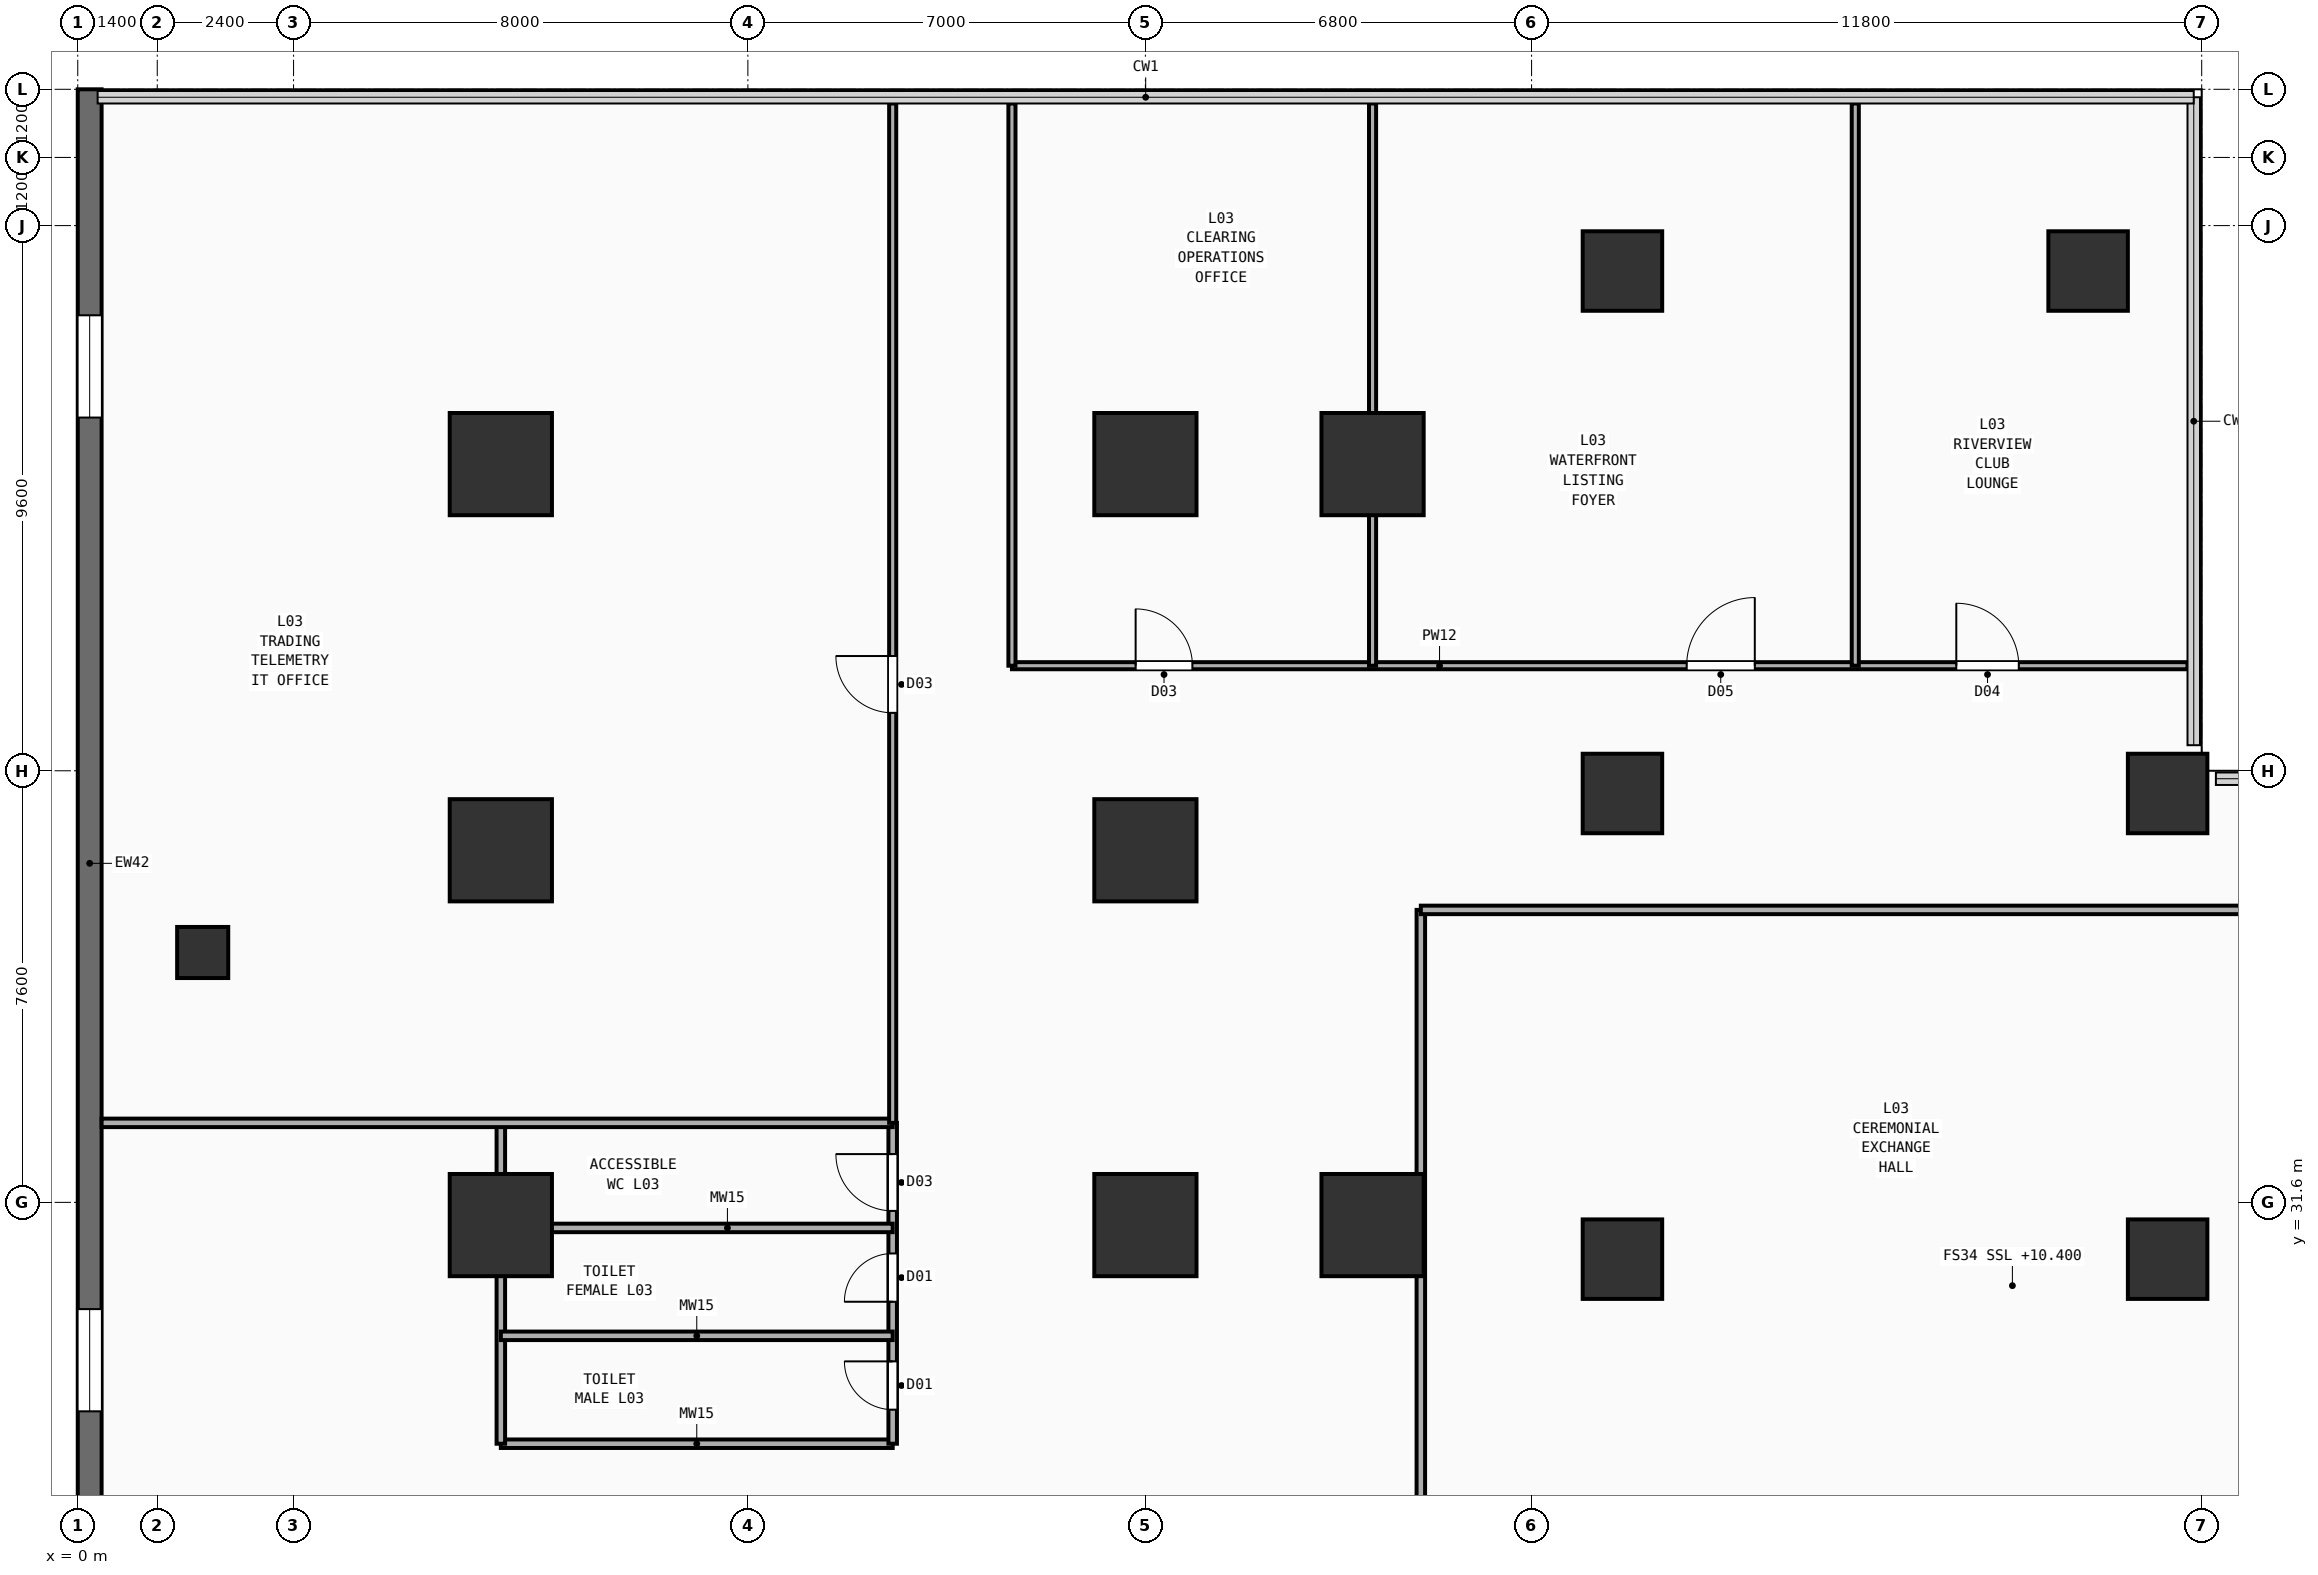
"""IFC4 building model, lengths in metres.
Left out: names, types, materials, properties, quantities, classifications, styles, units other than length and angle.
Written with IfcOpenShell. Run it as: python <this file> out.ifc"""

import sys

from ifc_helpers import new_model, si_unit, direction, frame, frame_2d, origin, origin_2d, place, context, subcontext, project, spatial, rectangle, extrude, element, fill, save


model = new_model("IFC4")
c1 = context("Model", 3, precision=1e-05, world=origin(), true_north=direction((0.0, 1.0)))
c2 = subcontext(c1, "Body", "Model", "MODEL_VIEW")
j1 = project(units=[si_unit("LENGTHUNIT", "METRE"), si_unit("PLANEANGLEUNIT", "RADIAN")], contexts=[c1])
p1 = place(None, origin())
s1 = spatial("IfcSite", under=j1, at=p1, CompositionType="ELEMENT")
p2 = place(p1, origin())
s2 = spatial("IfcBuilding", under=s1, at=p2, CompositionType="ELEMENT")
p3 = place(p2, frame((0.0, 0.0, 10.4)))
s3 = spatial("IfcBuildingStorey", under=s2, at=p3, CompositionType="ELEMENT", Elevation=10.4)
for number, where, z_axis, x_axis in (
    (1, (7.45, 31.2, 0.0), (0.0, 0.0, 1.0), (1.0, 0.0, 0.0)),
    (2, (7.45, 37.8, 0.0), (0.0, 0.0, 1.0), (1.0, 0.0, 0.0)),
    (3, (7.45, 44.6, 0.0), (0.0, 0.0, 1.0), (1.0, 0.0, 0.0)),
    (4, (18.8, 31.2, 0.0), (0.0, 0.0, 1.0), (1.0, 0.0, 0.0)),
    (5, (18.8, 37.8, 0.0), (0.0, 0.0, 1.0), (1.0, 0.0, 0.0)),
    (6, (18.8, 44.6, 0.0), (0.0, 0.0, 1.0), (1.0, 0.0, 0.0)),
    (7, (22.8, 31.2, 0.0), (0.0, 0.0, 1.0), (1.0, 0.0, 0.0)),
    (8, (22.8, 44.6, 0.0), (0.0, 0.0, 1.0), (1.0, 0.0, 0.0)),
):
    element("IfcColumn", number, at=place(p3, frame(where, z_axis=z_axis, x_axis=x_axis)), inside=s3, PredefinedType="COLUMN", context=c2, shape_type="SweptSolid", body=[
        extrude(rectangle(XDim=1.8, YDim=1.8, at=origin_2d()), origin(), (0.0, 0.0, 1.0), 4.46),
    ])
for number, where, z_axis, x_axis in (
    (9, (27.2, 30.6, 0.0), (0.0, 0.0, 1.0), (1.0, 0.0, 0.0)),
    (10, (36.8, 30.6, 0.0), (0.0, 0.0, 1.0), (1.0, 0.0, 0.0)),
    (11, (27.2, 38.8, 0.0), (0.0, 0.0, 1.0), (1.0, 0.0, 0.0)),
    (12, (36.8, 38.8, 0.0), (0.0, 0.0, 1.0), (1.0, 0.0, 0.0)),
    (13, (27.2, 48.0, 0.0), (0.0, 0.0, 1.0), (1.0, 0.0, 0.0)),
    (14, (35.4, 48.0, 0.0), (0.0, 0.0, 1.0), (1.0, 0.0, 0.0)),
):
    element("IfcColumn", number, at=place(p3, frame(where, z_axis=z_axis, x_axis=x_axis)), inside=s3, PredefinedType="COLUMN", context=c2, shape_type="SweptSolid", body=[
        extrude(rectangle(XDim=1.4, YDim=1.4, at=origin_2d()), origin(), (0.0, 0.0, 1.0), 4.46),
    ])
p4 = place(p3, frame((2.2, 36.0, 0.0), z_axis=(0.0, 0.0, 1.0), x_axis=(1.0, 0.0, 0.0)))
e15 = element("IfcColumn", 15, at=p4, inside=s3, PredefinedType="PILASTER", context=c2, shape_type="SweptSolid", body=[
    extrude(rectangle(XDim=0.9, YDim=0.9, at=origin_2d()), origin(), (0.0, 0.0, 1.0), 4.46),
])
p5 = place(p3, frame((0.21, 0.42, 0.0), z_axis=(0.0, 0.0, 1.0), x_axis=(0.0, 1.0, 0.0)))
e16 = element("IfcWall", 16, at=p5, inside=s3, PredefinedType="SOLIDWALL", context=c2, shape_type="SweptSolid", body=[
    extrude(rectangle(XDim=50.78, YDim=0.42, at=frame_2d((25.39, 0.0))), origin(), (0.0, 0.0, 1.0), 4.46),
])
p6 = place(p5, frame((8.0, 0.0, 0.95)))
e17 = element("IfcOpeningElement", 17, at=p6, cuts=e16, PredefinedType="OPENING", context=c2, shape_type="SweptSolid", body=[
    extrude(rectangle(XDim=1.8, YDim=2.1, at=frame_2d((0.9, 1.05))), frame((0.0, 0.22, 0.0), z_axis=(0.0, -1.0, 0.0), x_axis=(1.0, 0.0, 0.0)), (0.0, 0.0, 1.0), 0.44),
])
p7 = place(p5, frame((18.0, 0.0, 0.95)))
e18 = element("IfcOpeningElement", 18, at=p7, cuts=e16, PredefinedType="OPENING", context=c2, shape_type="SweptSolid", body=[
    extrude(rectangle(XDim=1.8, YDim=2.1, at=frame_2d((0.9, 1.05))), frame((0.0, 0.22, 0.0), z_axis=(0.0, -1.0, 0.0), x_axis=(1.0, 0.0, 0.0)), (0.0, 0.0, 1.0), 0.44),
])
p8 = place(p5, frame((27.5, 0.0, 0.95)))
e19 = element("IfcOpeningElement", 19, at=p8, cuts=e16, PredefinedType="OPENING", context=c2, shape_type="SweptSolid", body=[
    extrude(rectangle(XDim=1.8, YDim=2.1, at=frame_2d((0.9, 1.05))), frame((0.0, 0.22, 0.0), z_axis=(0.0, -1.0, 0.0), x_axis=(1.0, 0.0, 0.0)), (0.0, 0.0, 1.0), 0.44),
])
p9 = place(p5, frame((45.0, 0.0, 0.95)))
e20 = element("IfcOpeningElement", 20, at=p9, cuts=e16, PredefinedType="OPENING", context=c2, shape_type="SweptSolid", body=[
    extrude(rectangle(XDim=1.8, YDim=2.1, at=frame_2d((0.9, 1.05))), frame((0.0, 0.22, 0.0), z_axis=(0.0, -1.0, 0.0), x_axis=(1.0, 0.0, 0.0)), (0.0, 0.0, 1.0), 0.44),
])
p10 = place(p3, frame((7.45, 27.35, 0.0), z_axis=(0.0, 0.0, 1.0), x_axis=(1.0, 0.0, 0.0)))
e21 = element("IfcWall", 21, at=p10, inside=s3, PredefinedType="PLUMBINGWALL", context=c2, shape_type="SweptSolid", body=[
    extrude(rectangle(XDim=6.9, YDim=0.15, at=frame_2d((3.45, 0.0))), origin(), (0.0, 0.0, 1.0), 4.46),
])
p11 = place(p3, frame((7.45, 27.35, 0.0), z_axis=(0.0, 0.0, 1.0), x_axis=(0.0, 1.0, 0.0)))
e22 = element("IfcWall", 22, at=p11, inside=s3, PredefinedType="PLUMBINGWALL", context=c2, shape_type="SweptSolid", body=[
    extrude(rectangle(XDim=5.65, YDim=0.15, at=frame_2d((2.825, 0.0))), origin(), (0.0, 0.0, 1.0), 4.1),
])
p12 = place(p3, frame((14.35, 27.35, 0.0), z_axis=(0.0, 0.0, 1.0), x_axis=(0.0, 1.0, 0.0)))
e23 = element("IfcWall", 23, at=p12, inside=s3, PredefinedType="PLUMBINGWALL", context=c2, shape_type="SweptSolid", body=[
    extrude(rectangle(XDim=5.65, YDim=0.15, at=frame_2d((2.825, 0.0))), origin(), (0.0, 0.0, 1.0), 4.46),
])
p13 = place(p12, frame((0.6, 0.0, 0.0)))
e24 = element("IfcOpeningElement", 24, at=p13, cuts=e23, PredefinedType="OPENING", context=c2, shape_type="SweptSolid", body=[
    extrude(rectangle(XDim=0.85, YDim=2.15, at=frame_2d((0.425, 1.075))), frame((0.0, 0.085, 0.0), z_axis=(0.0, -1.0, 0.0), x_axis=(1.0, 0.0, 0.0)), (0.0, 0.0, 1.0), 0.17),
])
p14 = place(p12, frame((2.5, 0.0, 0.0)))
e25 = element("IfcOpeningElement", 25, at=p14, cuts=e23, PredefinedType="OPENING", context=c2, shape_type="SweptSolid", body=[
    extrude(rectangle(XDim=0.85, YDim=2.15, at=frame_2d((0.425, 1.075))), frame((0.0, 0.085, 0.0), z_axis=(0.0, -1.0, 0.0), x_axis=(1.0, 0.0, 0.0)), (0.0, 0.0, 1.0), 0.17),
])
p15 = place(p12, frame((4.1, 0.0, 0.0)))
e26 = element("IfcOpeningElement", 26, at=p15, cuts=e23, PredefinedType="OPENING", context=c2, shape_type="SweptSolid", body=[
    extrude(rectangle(XDim=1.0, YDim=2.2, at=frame_2d((0.5, 1.1))), frame((0.0, 0.085, 0.0), z_axis=(0.0, -1.0, 0.0), x_axis=(1.0, 0.0, 0.0)), (0.0, 0.0, 1.0), 0.17),
])
p16 = place(p3, frame((7.45, 29.25, 0.0), z_axis=(0.0, 0.0, 1.0), x_axis=(1.0, 0.0, 0.0)))
e27 = element("IfcWall", 27, at=p16, inside=s3, PredefinedType="PLUMBINGWALL", context=c2, shape_type="SweptSolid", body=[
    extrude(rectangle(XDim=6.9, YDim=0.15, at=frame_2d((3.45, 0.0))), origin(), (0.0, 0.0, 1.0), 3.96),
])
p17 = place(p3, frame((7.45, 31.15, 0.0), z_axis=(0.0, 0.0, 1.0), x_axis=(1.0, 0.0, 0.0)))
e28 = element("IfcWall", 28, at=p17, inside=s3, PredefinedType="PLUMBINGWALL", context=c2, shape_type="SweptSolid", body=[
    extrude(rectangle(XDim=6.9, YDim=0.15, at=frame_2d((3.45, 0.0))), origin(), (0.0, 0.0, 1.0), 3.76),
])
p18 = place(p3, frame((0.42, 33.0, 0.0), z_axis=(0.0, 0.0, 1.0), x_axis=(1.0, 0.0, 0.0)))
e29 = element("IfcWall", 29, at=p18, inside=s3, PredefinedType="PLUMBINGWALL", context=c2, shape_type="SweptSolid", body=[
    extrude(rectangle(XDim=13.93, YDim=0.15, at=frame_2d((6.965, 0.0))), origin(), (0.0, 0.0, 1.0), 4.46),
])
p19 = place(p3, frame((23.65, 16.35, 0.0), z_axis=(0.0, 0.0, 1.0), x_axis=(0.0, 1.0, 0.0)))
e30 = element("IfcWall", 30, at=p19, inside=s3, PredefinedType="PARTITIONING", context=c2, shape_type="SweptSolid", body=[
    extrude(rectangle(XDim=20.4, YDim=0.15, at=frame_2d((10.2, 0.0))), origin(), (0.0, 0.0, 1.0), 4.46),
])
p20 = place(p3, frame((23.65, 36.75, 0.0), z_axis=(0.0, 0.0, 1.0), x_axis=(1.0, 0.0, 0.0)))
e31 = element("IfcWall", 31, at=p20, inside=s3, PredefinedType="PARTITIONING", context=c2, shape_type="SweptSolid", body=[
    extrude(rectangle(XDim=40.9, YDim=0.15, at=frame_2d((20.45, 0.0))), origin(), (0.0, 0.0, 1.0), 4.46),
])
p21 = place(p3, frame((14.35, 33.0, 0.0), z_axis=(0.0, 0.0, 1.0), x_axis=(0.0, 1.0, 0.0)))
e32 = element("IfcWall", 32, at=p21, inside=s3, PredefinedType="PARTITIONING", context=c2, shape_type="SweptSolid", body=[
    extrude(rectangle(XDim=17.95, YDim=0.125, at=frame_2d((8.975, 0.0))), origin(), (0.0, 0.0, 1.0), 4.46),
])
p22 = place(p21, frame((7.22, 0.0, 0.0)))
e33 = element("IfcOpeningElement", 33, at=p22, cuts=e32, PredefinedType="OPENING", context=c2, shape_type="SweptSolid", body=[
    extrude(rectangle(XDim=1.0, YDim=2.2, at=frame_2d((0.5, 1.1))), frame((0.0, 0.073, 0.0), z_axis=(0.0, -1.0, 0.0), x_axis=(1.0, 0.0, 0.0)), (0.0, 0.0, 1.0), 0.145),
])
p23 = place(p3, frame((16.45, 41.05, 0.0), z_axis=(0.0, 0.0, 1.0), x_axis=(1.0, 0.0, 0.0)))
e34 = element("IfcWall", 34, at=p23, inside=s3, PredefinedType="PARTITIONING", context=c2, shape_type="SweptSolid", body=[
    extrude(rectangle(XDim=20.7, YDim=0.125, at=frame_2d((10.35, 0.0))), origin(), (0.0, 0.0, 1.0), 4.46),
])
p24 = place(p23, frame((2.178, 0.0, 0.0)))
e35 = element("IfcOpeningElement", 35, at=p24, cuts=e34, PredefinedType="OPENING", context=c2, shape_type="SweptSolid", body=[
    extrude(rectangle(XDim=1.0, YDim=2.2, at=frame_2d((0.5, 1.1))), frame((0.0, 0.073, 0.0), z_axis=(0.0, -1.0, 0.0), x_axis=(1.0, 0.0, 0.0)), (0.0, 0.0, 1.0), 0.145),
])
p25 = place(p23, frame((11.881, 0.0, 0.0)))
e36 = element("IfcOpeningElement", 36, at=p25, cuts=e34, PredefinedType="OPENING", context=c2, shape_type="SweptSolid", body=[
    extrude(rectangle(XDim=1.2, YDim=2.25, at=frame_2d((0.6, 1.125))), frame((0.0, 0.073, 0.0), z_axis=(0.0, -1.0, 0.0), x_axis=(1.0, 0.0, 0.0)), (0.0, 0.0, 1.0), 0.145),
])
p26 = place(p23, frame((16.629, 0.0, 0.0)))
e37 = element("IfcOpeningElement", 37, at=p26, cuts=e34, PredefinedType="OPENING", context=c2, shape_type="SweptSolid", body=[
    extrude(rectangle(XDim=1.1, YDim=2.2, at=frame_2d((0.55, 1.1))), frame((0.0, 0.073, 0.0), z_axis=(0.0, -1.0, 0.0), x_axis=(1.0, 0.0, 0.0)), (0.0, 0.0, 1.0), 0.145),
])
for number, where, z_axis, x_axis in (
    (38, (16.45, 41.05, 0.0), (0.0, 0.0, 1.0), (0.0, 1.0, 0.0)),
    (39, (22.8, 41.05, 0.0), (0.0, 0.0, 1.0), (0.0, 1.0, 0.0)),
    (40, (31.3, 41.05, 0.0), (0.0, 0.0, 1.0), (0.0, 1.0, 0.0)),
):
    element("IfcWall", number, at=place(p3, frame(where, z_axis=z_axis, x_axis=x_axis)), inside=s3, PredefinedType="PARTITIONING", context=c2, shape_type="SweptSolid", body=[
        extrude(rectangle(XDim=9.9, YDim=0.125, at=frame_2d((4.95, 0.0))), origin(), (0.0, 0.0, 1.0), 4.46),
    ])
p27 = place(p8, origin())
e41 = element("IfcWindow", 41, at=p27, inside=s3, PartitioningType="SINGLE_PANEL", PredefinedType="WINDOW", context=c2, shape_type="SweptSolid", body=[
    extrude(rectangle(XDim=1.8, YDim=2.1, at=frame_2d((0.9, 1.05))), frame((0.0, 0.03, 0.0), z_axis=(0.0, -1.0, 0.0), x_axis=(1.0, 0.0, 0.0)), (0.0, 0.0, 1.0), 0.06),
])
fill(e19, e41)
p28 = place(p9, origin())
e42 = element("IfcWindow", 42, at=p28, inside=s3, PartitioningType="SINGLE_PANEL", PredefinedType="WINDOW", context=c2, shape_type="SweptSolid", body=[
    extrude(rectangle(XDim=1.8, YDim=2.1, at=frame_2d((0.9, 1.05))), frame((0.0, 0.03, 0.0), z_axis=(0.0, -1.0, 0.0), x_axis=(1.0, 0.0, 0.0)), (0.0, 0.0, 1.0), 0.06),
])
fill(e20, e42)
p29 = place(p13, origin())
e43 = element("IfcDoor", 43, at=p29, inside=s3, OperationType="SINGLE_SWING_RIGHT", PredefinedType="DOOR", context=c2, shape_type="SweptSolid", body=[
    extrude(rectangle(XDim=0.85, YDim=2.15, at=frame_2d((0.425, 1.075))), frame((0.0, 0.025, 0.0), z_axis=(0.0, -1.0, 0.0), x_axis=(1.0, 0.0, 0.0)), (0.0, 0.0, 1.0), 0.05),
])
fill(e24, e43)
p30 = place(p14, origin())
e44 = element("IfcDoor", 44, at=p30, inside=s3, OperationType="SINGLE_SWING_LEFT", PredefinedType="DOOR", context=c2, shape_type="SweptSolid", body=[
    extrude(rectangle(XDim=0.85, YDim=2.15, at=frame_2d((0.425, 1.075))), frame((0.0, 0.025, 0.0), z_axis=(0.0, -1.0, 0.0), x_axis=(1.0, 0.0, 0.0)), (0.0, 0.0, 1.0), 0.05),
])
fill(e25, e44)
p31 = place(p15, origin())
e45 = element("IfcDoor", 45, at=p31, inside=s3, OperationType="SINGLE_SWING_RIGHT", PredefinedType="DOOR", context=c2, shape_type="SweptSolid", body=[
    extrude(rectangle(XDim=1.0, YDim=2.2, at=frame_2d((0.5, 1.1))), frame((0.0, 0.025, 0.0), z_axis=(0.0, -1.0, 0.0), x_axis=(1.0, 0.0, 0.0)), (0.0, 0.0, 1.0), 0.05),
])
fill(e26, e45)
p32 = place(p22, origin())
e46 = element("IfcDoor", 46, at=p32, inside=s3, OperationType="SINGLE_SWING_RIGHT", PredefinedType="DOOR", context=c2, shape_type="SweptSolid", body=[
    extrude(rectangle(XDim=1.0, YDim=2.2, at=frame_2d((0.5, 1.1))), frame((0.0, 0.025, 0.0), z_axis=(0.0, -1.0, 0.0), x_axis=(1.0, 0.0, 0.0)), (0.0, 0.0, 1.0), 0.05),
])
fill(e33, e46)
p33 = place(p24, origin())
e47 = element("IfcDoor", 47, at=p33, inside=s3, OperationType="SINGLE_SWING_LEFT", PredefinedType="DOOR", context=c2, shape_type="SweptSolid", body=[
    extrude(rectangle(XDim=1.0, YDim=2.2, at=frame_2d((0.5, 1.1))), frame((0.0, 0.025, 0.0), z_axis=(0.0, -1.0, 0.0), x_axis=(1.0, 0.0, 0.0)), (0.0, 0.0, 1.0), 0.05),
])
fill(e35, e47)
p34 = place(p25, origin())
e48 = element("IfcDoor", 48, at=p34, inside=s3, OperationType="SINGLE_SWING_RIGHT", PredefinedType="DOOR", context=c2, shape_type="SweptSolid", body=[
    extrude(rectangle(XDim=1.2, YDim=2.25, at=frame_2d((0.6, 1.125))), frame((0.0, 0.025, 0.0), z_axis=(0.0, -1.0, 0.0), x_axis=(1.0, 0.0, 0.0)), (0.0, 0.0, 1.0), 0.05),
])
fill(e36, e48)
p35 = place(p26, origin())
e49 = element("IfcDoor", 49, at=p35, inside=s3, OperationType="SINGLE_SWING_LEFT", PredefinedType="DOOR", context=c2, shape_type="SweptSolid", body=[
    extrude(rectangle(XDim=1.1, YDim=2.2, at=frame_2d((0.55, 1.1))), frame((0.0, 0.025, 0.0), z_axis=(0.0, -1.0, 0.0), x_axis=(1.0, 0.0, 0.0)), (0.0, 0.0, 1.0), 0.05),
])
fill(e37, e49)
save(model, sys.argv[1])
